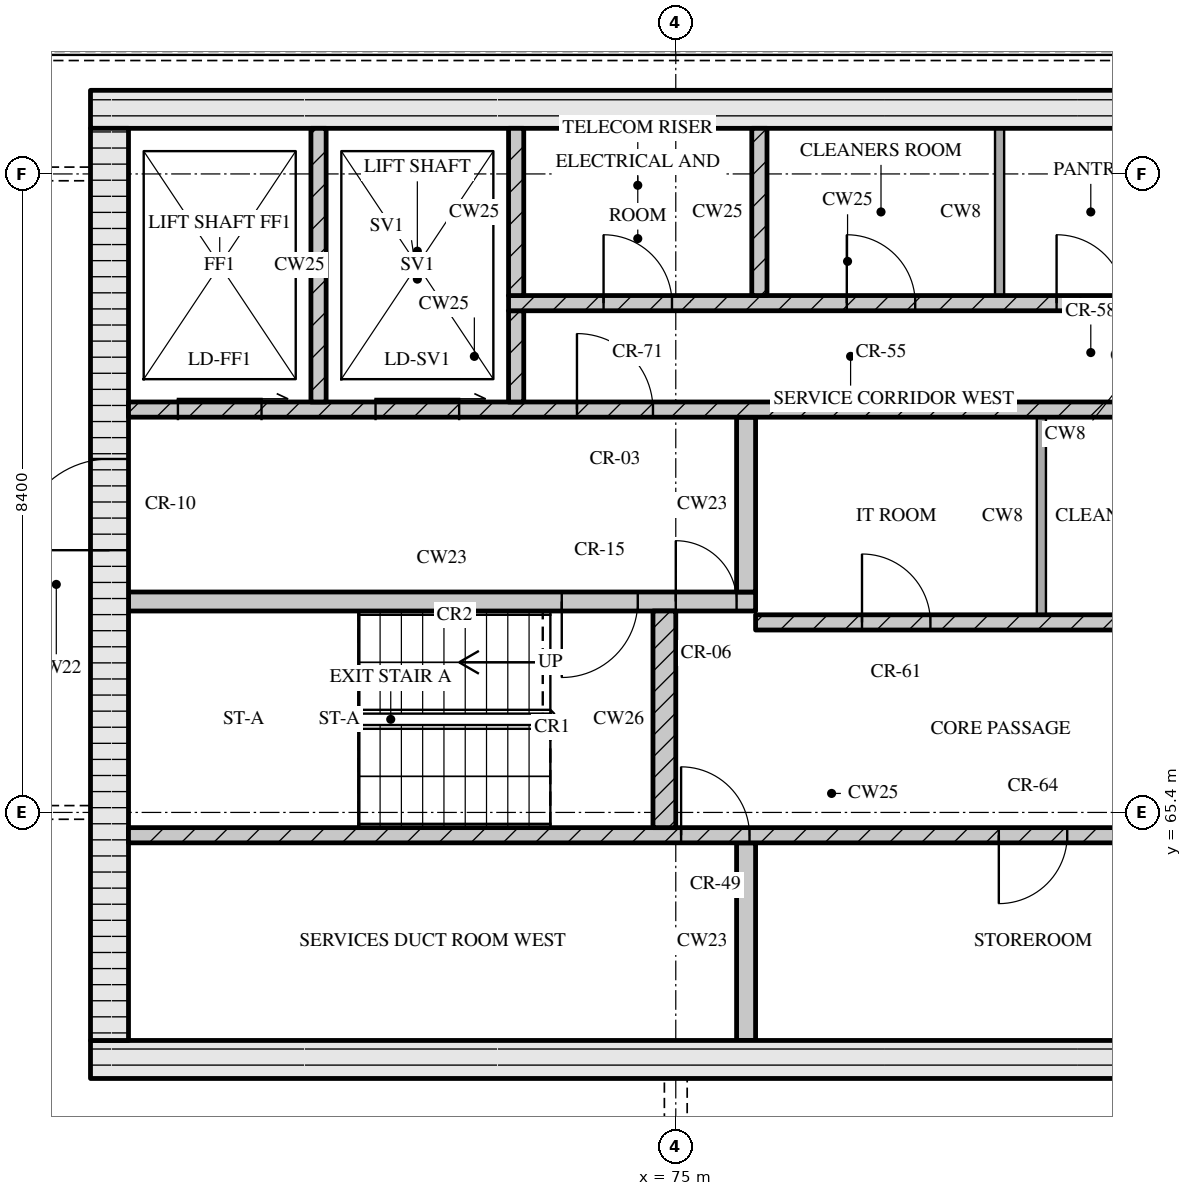
"""IFC4 building model, lengths in metres.
Left out: names, types, materials, properties, quantities, classifications, styles, units other than length and angle.
Written with IfcOpenShell. Run it as: python <this file> out.ifc"""

import sys

from ifc_helpers import new_model, si_unit, direction, frame, frame_2d, origin, place, context, subcontext, project, spatial, rectangle, extrude, element, fill, save


model = new_model("IFC4")
c1 = context("Model", 3, precision=1e-05, world=origin(), true_north=direction((0.0, 1.0)))
c2 = subcontext(c1, "Body", "Model", "MODEL_VIEW")
j1 = project(units=[si_unit("LENGTHUNIT", "METRE"), si_unit("PLANEANGLEUNIT", "RADIAN")], contexts=[c1])
p1 = place(None, origin())
s1 = spatial("IfcSite", under=j1, at=p1, CompositionType="ELEMENT")
p2 = place(p1, origin())
s2 = spatial("IfcBuilding", under=s1, at=p2, CompositionType="ELEMENT")
p3 = place(p2, frame((0.0, 0.0, 267.15)))
s3 = spatial("IfcBuildingStorey", under=s2, at=p3, CompositionType="ELEMENT", Elevation=267.15)
p4 = place(p3, frame((67.3, 62.15, 0.0), z_axis=(0.0, 0.0, 1.0), x_axis=(1.0, 0.0, 0.0)))
e1 = element("IfcWall", 1, at=p4, inside=s3, PredefinedType="SOLIDWALL", context=c2, shape_type="SweptSolid", body=[
    extrude(rectangle(XDim=40.6, YDim=0.5, at=frame_2d((20.3, 0.0))), origin(), (0.0, 0.0, 1.0), 3.32),
])
p5 = place(p4, frame((20.65, 0.0, 0.0)))
e2 = element("IfcOpeningElement", 2, at=p5, cuts=e1, PredefinedType="OPENING", context=c2, shape_type="SweptSolid", body=[
    extrude(rectangle(XDim=1.8, YDim=2.1, at=frame_2d((0.9, 1.05))), frame((0.0, 0.26, 0.0), z_axis=(0.0, -1.0, 0.0), x_axis=(1.0, 0.0, 0.0)), (0.0, 0.0, 1.0), 0.52),
])
p6 = place(p3, frame((67.3, 74.65, 0.0), z_axis=(0.0, 0.0, 1.0), x_axis=(1.0, 0.0, 0.0)))
e3 = element("IfcWall", 3, at=p6, inside=s3, PredefinedType="SOLIDWALL", context=c2, shape_type="SweptSolid", body=[
    extrude(rectangle(XDim=40.6, YDim=0.5, at=frame_2d((20.3, 0.0))), origin(), (0.0, 0.0, 1.0), 3.32),
])
p7 = place(p3, frame((67.55, 62.4, 0.0), z_axis=(0.0, 0.0, 1.0), x_axis=(0.0, 1.0, 0.0)))
e4 = element("IfcWall", 4, at=p7, inside=s3, PredefinedType="SOLIDWALL", context=c2, shape_type="SweptSolid", body=[
    extrude(rectangle(XDim=12.0, YDim=0.5, at=frame_2d((6.0, 0.0))), origin(), (0.0, 0.0, 1.0), 3.32),
])
p8 = place(p7, frame((6.45, 0.0, 0.0)))
e5 = element("IfcOpeningElement", 5, at=p8, cuts=e4, PredefinedType="OPENING", context=c2, shape_type="SweptSolid", body=[
    extrude(rectangle(XDim=1.2, YDim=2.1, at=frame_2d((0.6, 1.05))), frame((0.0, 0.26, 0.0), z_axis=(0.0, -1.0, 0.0), x_axis=(1.0, 0.0, 0.0)), (0.0, 0.0, 1.0), 0.52),
])
p9 = place(p3, frame((75.925, 62.4, 0.0), z_axis=(0.0, 0.0, 1.0), x_axis=(0.0, 1.0, 0.0)))
e6 = element("IfcWall", 6, at=p9, inside=s3, PredefinedType="SOLIDWALL", context=c2, shape_type="SweptSolid", body=[
    extrude(rectangle(XDim=2.6, YDim=0.25, at=frame_2d((1.3, 0.0))), origin(), (0.0, 0.0, 1.0), 3.32),
])
p10 = place(p3, frame((67.8, 65.1, 0.0), z_axis=(0.0, 0.0, 1.0), x_axis=(1.0, 0.0, 0.0)))
e7 = element("IfcWall", 7, at=p10, inside=s3, PredefinedType="SOLIDWALL", context=c2, shape_type="SweptSolid", body=[
    extrude(rectangle(XDim=18.5, YDim=0.2, at=frame_2d((9.25, 0.0))), origin(), (0.0, 0.0, 1.0), 3.32),
])
p11 = place(p10, frame((7.27, 0.0, 0.0)))
e8 = element("IfcOpeningElement", 8, at=p11, cuts=e7, PredefinedType="OPENING", context=c2, shape_type="SweptSolid", body=[
    extrude(rectangle(XDim=0.9, YDim=2.1, at=frame_2d((0.45, 1.05))), frame((0.0, 0.11, 0.0), z_axis=(0.0, -1.0, 0.0), x_axis=(1.0, 0.0, 0.0)), (0.0, 0.0, 1.0), 0.22),
])
p12 = place(p10, frame((11.45, 0.0, 0.0)))
e9 = element("IfcOpeningElement", 9, at=p12, cuts=e7, PredefinedType="OPENING", context=c2, shape_type="SweptSolid", body=[
    extrude(rectangle(XDim=0.9, YDim=2.1, at=frame_2d((0.45, 1.05))), frame((0.0, 0.11, 0.0), z_axis=(0.0, -1.0, 0.0), x_axis=(1.0, 0.0, 0.0)), (0.0, 0.0, 1.0), 0.22),
])
p13 = place(p10, frame((16.7, 0.0, 0.0)))
e10 = element("IfcOpeningElement", 10, at=p13, cuts=e7, PredefinedType="OPENING", context=c2, shape_type="SweptSolid", body=[
    extrude(rectangle(XDim=0.9, YDim=2.1, at=frame_2d((0.45, 1.05))), frame((0.0, 0.11, 0.0), z_axis=(0.0, -1.0, 0.0), x_axis=(1.0, 0.0, 0.0)), (0.0, 0.0, 1.0), 0.22),
])
p14 = place(p3, frame((74.85, 65.2, 0.0), z_axis=(0.0, 0.0, 1.0), x_axis=(0.0, 1.0, 0.0)))
e11 = element("IfcWall", 11, at=p14, inside=s3, PredefinedType="SOLIDWALL", context=c2, shape_type="SweptSolid", body=[
    extrude(rectangle(XDim=2.85, YDim=0.3, at=frame_2d((1.425, 0.0))), origin(), (0.0, 0.0, 1.0), 3.32),
])
p15 = place(p3, frame((76.05, 67.9, 0.0), z_axis=(0.0, 0.0, 1.0), x_axis=(1.0, 0.0, 0.0)))
e12 = element("IfcWall", 12, at=p15, inside=s3, PredefinedType="SOLIDWALL", context=c2, shape_type="SweptSolid", body=[
    extrude(rectangle(XDim=23.1, YDim=0.2, at=frame_2d((11.55, 0.0))), origin(), (0.0, 0.0, 1.0), 3.32),
])
p16 = place(p15, frame((1.4, 0.0, 0.0)))
e13 = element("IfcOpeningElement", 13, at=p16, cuts=e12, PredefinedType="OPENING", context=c2, shape_type="SweptSolid", body=[
    extrude(rectangle(XDim=0.9, YDim=2.1, at=frame_2d((0.45, 1.05))), frame((0.0, 0.11, 0.0), z_axis=(0.0, -1.0, 0.0), x_axis=(1.0, 0.0, 0.0)), (0.0, 0.0, 1.0), 0.22),
])
p17 = place(p15, frame((5.11, 0.0, 0.0)))
e14 = element("IfcOpeningElement", 14, at=p17, cuts=e12, PredefinedType="OPENING", context=c2, shape_type="SweptSolid", body=[
    extrude(rectangle(XDim=0.9, YDim=2.1, at=frame_2d((0.45, 1.05))), frame((0.0, 0.11, 0.0), z_axis=(0.0, -1.0, 0.0), x_axis=(1.0, 0.0, 0.0)), (0.0, 0.0, 1.0), 0.22),
])
p18 = place(p15, frame((8.45, 0.0, 0.0)))
e15 = element("IfcOpeningElement", 15, at=p18, cuts=e12, PredefinedType="OPENING", context=c2, shape_type="SweptSolid", body=[
    extrude(rectangle(XDim=0.9, YDim=2.1, at=frame_2d((0.45, 1.05))), frame((0.0, 0.11, 0.0), z_axis=(0.0, -1.0, 0.0), x_axis=(1.0, 0.0, 0.0)), (0.0, 0.0, 1.0), 0.22),
])
p19 = place(p15, frame((10.91, 0.0, 0.0)))
e16 = element("IfcOpeningElement", 16, at=p19, cuts=e12, PredefinedType="OPENING", context=c2, shape_type="SweptSolid", body=[
    extrude(rectangle(XDim=0.9, YDim=2.1, at=frame_2d((0.45, 1.05))), frame((0.0, 0.11, 0.0), z_axis=(0.0, -1.0, 0.0), x_axis=(1.0, 0.0, 0.0)), (0.0, 0.0, 1.0), 0.22),
])
p20 = place(p15, frame((13.55, 0.0, 0.0)))
e17 = element("IfcOpeningElement", 17, at=p20, cuts=e12, PredefinedType="OPENING", context=c2, shape_type="SweptSolid", body=[
    extrude(rectangle(XDim=1.0, YDim=2.1, at=frame_2d((0.5, 1.05))), frame((0.0, 0.11, 0.0), z_axis=(0.0, -1.0, 0.0), x_axis=(1.0, 0.0, 0.0)), (0.0, 0.0, 1.0), 0.22),
])
p21 = place(p15, frame((16.2, 0.0, 0.0)))
e18 = element("IfcOpeningElement", 18, at=p21, cuts=e12, PredefinedType="OPENING", context=c2, shape_type="SweptSolid", body=[
    extrude(rectangle(XDim=1.1, YDim=2.1, at=frame_2d((0.55, 1.05))), frame((0.0, 0.11, 0.0), z_axis=(0.0, -1.0, 0.0), x_axis=(1.0, 0.0, 0.0)), (0.0, 0.0, 1.0), 0.22),
])
p22 = place(p15, frame((18.7, 0.0, 0.0)))
e19 = element("IfcOpeningElement", 19, at=p22, cuts=e12, PredefinedType="OPENING", context=c2, shape_type="SweptSolid", body=[
    extrude(rectangle(XDim=1.1, YDim=2.1, at=frame_2d((0.55, 1.05))), frame((0.0, 0.11, 0.0), z_axis=(0.0, -1.0, 0.0), x_axis=(1.0, 0.0, 0.0)), (0.0, 0.0, 1.0), 0.22),
])
p23 = place(p15, frame((21.2, 0.0, 0.0)))
e20 = element("IfcOpeningElement", 20, at=p23, cuts=e12, PredefinedType="OPENING", context=c2, shape_type="SweptSolid", body=[
    extrude(rectangle(XDim=1.1, YDim=2.1, at=frame_2d((0.55, 1.05))), frame((0.0, 0.11, 0.0), z_axis=(0.0, -1.0, 0.0), x_axis=(1.0, 0.0, 0.0)), (0.0, 0.0, 1.0), 0.22),
])
p24 = place(p3, frame((79.81, 68.0, 0.0), z_axis=(0.0, 0.0, 1.0), x_axis=(0.0, 1.0, 0.0)))
e21 = element("IfcWall", 21, at=p24, inside=s3, PredefinedType="PARTITIONING", context=c2, shape_type="SweptSolid", body=[
    extrude(rectangle(XDim=2.6, YDim=0.12, at=frame_2d((1.3, 0.0))), origin(), (0.0, 0.0, 1.0), 3.32),
])
p25 = place(p3, frame((67.8, 68.175, 0.0), z_axis=(0.0, 0.0, 1.0), x_axis=(1.0, 0.0, 0.0)))
e22 = element("IfcWall", 22, at=p25, inside=s3, PredefinedType="SOLIDWALL", context=c2, shape_type="SweptSolid", body=[
    extrude(rectangle(XDim=8.25, YDim=0.25, at=frame_2d((4.125, 0.0))), origin(), (0.0, 0.0, 1.0), 3.32),
])
p26 = place(p25, frame((5.7, 0.0, 0.0)))
e23 = element("IfcOpeningElement", 23, at=p26, cuts=e22, PredefinedType="OPENING", context=c2, shape_type="SweptSolid", body=[
    extrude(rectangle(XDim=1.0, YDim=2.1, at=frame_2d((0.5, 1.05))), frame((0.0, 0.135, 0.0), z_axis=(0.0, -1.0, 0.0), x_axis=(1.0, 0.0, 0.0)), (0.0, 0.0, 1.0), 0.27),
])
p27 = place(p25, frame((7.2, 0.0, 0.0)))
e24 = element("IfcOpeningElement", 24, at=p27, cuts=e22, PredefinedType="OPENING", context=c2, shape_type="SweptSolid", body=[
    extrude(rectangle(XDim=0.8, YDim=2.1, at=frame_2d((0.4, 1.05))), frame((0.0, 0.135, 0.0), z_axis=(0.0, -1.0, 0.0), x_axis=(1.0, 0.0, 0.0)), (0.0, 0.0, 1.0), 0.27),
])
p28 = place(p3, frame((75.925, 68.3, 0.0), z_axis=(0.0, 0.0, 1.0), x_axis=(0.0, 1.0, 0.0)))
e25 = element("IfcWall", 25, at=p28, inside=s3, PredefinedType="SOLIDWALL", context=c2, shape_type="SweptSolid", body=[
    extrude(rectangle(XDim=2.3, YDim=0.25, at=frame_2d((1.15, 0.0))), origin(), (0.0, 0.0, 1.0), 3.32),
])
p29 = place(p3, frame((67.8, 70.7, 0.0), z_axis=(0.0, 0.0, 1.0), x_axis=(1.0, 0.0, 0.0)))
e26 = element("IfcWall", 26, at=p29, inside=s3, PredefinedType="SOLIDWALL", context=c2, shape_type="SweptSolid", body=[
    extrude(rectangle(XDim=39.6, YDim=0.2, at=frame_2d((19.8, 0.0))), origin(), (0.0, 0.0, 1.0), 3.32),
])
p30 = place(p29, frame((0.65, 0.0, 0.0)))
e27 = element("IfcOpeningElement", 27, at=p30, cuts=e26, PredefinedType="OPENING", context=c2, shape_type="SweptSolid", body=[
    extrude(rectangle(XDim=1.1, YDim=2.1, at=frame_2d((0.55, 1.05))), frame((0.0, 0.11, 0.0), z_axis=(0.0, -1.0, 0.0), x_axis=(1.0, 0.0, 0.0)), (0.0, 0.0, 1.0), 0.22),
])
p31 = place(p29, frame((3.25, 0.0, 0.0)))
e28 = element("IfcOpeningElement", 28, at=p31, cuts=e26, PredefinedType="OPENING", context=c2, shape_type="SweptSolid", body=[
    extrude(rectangle(XDim=1.1, YDim=2.1, at=frame_2d((0.55, 1.05))), frame((0.0, 0.11, 0.0), z_axis=(0.0, -1.0, 0.0), x_axis=(1.0, 0.0, 0.0)), (0.0, 0.0, 1.0), 0.22),
])
p32 = place(p29, frame((5.9, 0.0, 0.0)))
e29 = element("IfcOpeningElement", 29, at=p32, cuts=e26, PredefinedType="OPENING", context=c2, shape_type="SweptSolid", body=[
    extrude(rectangle(XDim=1.0, YDim=2.1, at=frame_2d((0.5, 1.05))), frame((0.0, 0.11, 0.0), z_axis=(0.0, -1.0, 0.0), x_axis=(1.0, 0.0, 0.0)), (0.0, 0.0, 1.0), 0.22),
])
p33 = place(p29, frame((21.7, 0.0, 0.0)))
e30 = element("IfcOpeningElement", 30, at=p33, cuts=e26, PredefinedType="OPENING", context=c2, shape_type="SweptSolid", body=[
    extrude(rectangle(XDim=1.0, YDim=2.1, at=frame_2d((0.5, 1.05))), frame((0.0, 0.11, 0.0), z_axis=(0.0, -1.0, 0.0), x_axis=(1.0, 0.0, 0.0)), (0.0, 0.0, 1.0), 0.22),
])
p34 = place(p29, frame((32.7, 0.0, 0.0)))
e31 = element("IfcOpeningElement", 31, at=p34, cuts=e26, PredefinedType="OPENING", context=c2, shape_type="SweptSolid", body=[
    extrude(rectangle(XDim=1.0, YDim=2.1, at=frame_2d((0.5, 1.05))), frame((0.0, 0.11, 0.0), z_axis=(0.0, -1.0, 0.0), x_axis=(1.0, 0.0, 0.0)), (0.0, 0.0, 1.0), 0.22),
])
p35 = place(p29, frame((35.25, 0.0, 0.0)))
e32 = element("IfcOpeningElement", 32, at=p35, cuts=e26, PredefinedType="OPENING", context=c2, shape_type="SweptSolid", body=[
    extrude(rectangle(XDim=1.1, YDim=2.1, at=frame_2d((0.55, 1.05))), frame((0.0, 0.11, 0.0), z_axis=(0.0, -1.0, 0.0), x_axis=(1.0, 0.0, 0.0)), (0.0, 0.0, 1.0), 0.22),
])
p36 = place(p29, frame((37.85, 0.0, 0.0)))
e33 = element("IfcOpeningElement", 33, at=p36, cuts=e26, PredefinedType="OPENING", context=c2, shape_type="SweptSolid", body=[
    extrude(rectangle(XDim=1.1, YDim=2.1, at=frame_2d((0.55, 1.05))), frame((0.0, 0.11, 0.0), z_axis=(0.0, -1.0, 0.0), x_axis=(1.0, 0.0, 0.0)), (0.0, 0.0, 1.0), 0.22),
])
p37 = place(p3, frame((70.3, 70.8, 0.0), z_axis=(0.0, 0.0, 1.0), x_axis=(0.0, 1.0, 0.0)))
e34 = element("IfcWall", 34, at=p37, inside=s3, PredefinedType="SOLIDWALL", context=c2, shape_type="SweptSolid", body=[
    extrude(rectangle(XDim=3.6, YDim=0.2, at=frame_2d((1.8, 0.0))), origin(), (0.0, 0.0, 1.0), 3.32),
])
p38 = place(p3, frame((72.9, 70.8, 0.0), z_axis=(0.0, 0.0, 1.0), x_axis=(0.0, 1.0, 0.0)))
e35 = element("IfcWall", 35, at=p38, inside=s3, PredefinedType="SOLIDWALL", context=c2, shape_type="SweptSolid", body=[
    extrude(rectangle(XDim=1.2, YDim=0.2, at=frame_2d((0.6, 0.0))), origin(), (0.0, 0.0, 1.0), 3.32),
])
p39 = place(p3, frame((72.8, 72.1, 0.0), z_axis=(0.0, 0.0, 1.0), x_axis=(1.0, 0.0, 0.0)))
e36 = element("IfcWall", 36, at=p39, inside=s3, PredefinedType="SOLIDWALL", context=c2, shape_type="SweptSolid", body=[
    extrude(rectangle(XDim=8.92, YDim=0.2, at=frame_2d((4.46, 0.0))), origin(), (0.0, 0.0, 1.0), 3.32),
])
p40 = place(p39, frame((1.25, 0.0, 0.0)))
e37 = element("IfcOpeningElement", 37, at=p40, cuts=e36, PredefinedType="OPENING", context=c2, shape_type="SweptSolid", body=[
    extrude(rectangle(XDim=0.9, YDim=2.1, at=frame_2d((0.45, 1.05))), frame((0.0, 0.11, 0.0), z_axis=(0.0, -1.0, 0.0), x_axis=(1.0, 0.0, 0.0)), (0.0, 0.0, 1.0), 0.22),
])
p41 = place(p39, frame((4.45, 0.0, 0.0)))
e38 = element("IfcOpeningElement", 38, at=p41, cuts=e36, PredefinedType="OPENING", context=c2, shape_type="SweptSolid", body=[
    extrude(rectangle(XDim=0.9, YDim=2.1, at=frame_2d((0.45, 1.05))), frame((0.0, 0.11, 0.0), z_axis=(0.0, -1.0, 0.0), x_axis=(1.0, 0.0, 0.0)), (0.0, 0.0, 1.0), 0.22),
])
p42 = place(p39, frame((7.21, 0.0, 0.0)))
e39 = element("IfcOpeningElement", 39, at=p42, cuts=e36, PredefinedType="OPENING", context=c2, shape_type="SweptSolid", body=[
    extrude(rectangle(XDim=0.9, YDim=2.1, at=frame_2d((0.45, 1.05))), frame((0.0, 0.11, 0.0), z_axis=(0.0, -1.0, 0.0), x_axis=(1.0, 0.0, 0.0)), (0.0, 0.0, 1.0), 0.22),
])
for number, where, z_axis, x_axis in (
    (40, (72.9, 72.2, 0.0), (0.0, 0.0, 1.0), (0.0, 1.0, 0.0)),
    (41, (76.1, 72.2, 0.0), (0.0, 0.0, 1.0), (0.0, 1.0, 0.0)),
):
    element("IfcWall", number, at=place(p3, frame(where, z_axis=z_axis, x_axis=x_axis)), inside=s3, PredefinedType="SOLIDWALL", context=c2, shape_type="SweptSolid", body=[
        extrude(rectangle(XDim=2.2, YDim=0.2, at=frame_2d((1.1, 0.0))), origin(), (0.0, 0.0, 1.0), 3.32),
    ])
p43 = place(p3, frame((79.26, 72.2, 0.0), z_axis=(0.0, 0.0, 1.0), x_axis=(0.0, 1.0, 0.0)))
e42 = element("IfcWall", 42, at=p43, inside=s3, PredefinedType="PARTITIONING", context=c2, shape_type="SweptSolid", body=[
    extrude(rectangle(XDim=2.2, YDim=0.12, at=frame_2d((1.1, 0.0))), origin(), (0.0, 0.0, 1.0), 3.32),
])
p44 = place(p11, origin())
e43 = element("IfcDoor", 43, at=p44, inside=s3, OperationType="SINGLE_SWING_LEFT", PredefinedType="DOOR", context=c2, shape_type="SweptSolid", body=[
    extrude(rectangle(XDim=0.9, YDim=2.1, at=frame_2d((0.45, 1.05))), frame((0.0, 0.025, 0.0), z_axis=(0.0, -1.0, 0.0), x_axis=(1.0, 0.0, 0.0)), (0.0, 0.0, 1.0), 0.05),
])
fill(e8, e43)
p45 = place(p12, origin())
e44 = element("IfcDoor", 44, at=p45, inside=s3, OperationType="SINGLE_SWING_RIGHT", PredefinedType="DOOR", context=c2, shape_type="SweptSolid", body=[
    extrude(rectangle(XDim=0.9, YDim=2.1, at=frame_2d((0.45, 1.05))), frame((0.0, 0.025, 0.0), z_axis=(0.0, -1.0, 0.0), x_axis=(1.0, 0.0, 0.0)), (0.0, 0.0, 1.0), 0.05),
])
fill(e9, e44)
p46 = place(p16, origin())
e45 = element("IfcDoor", 45, at=p46, inside=s3, OperationType="SINGLE_SWING_LEFT", PredefinedType="DOOR", context=c2, shape_type="SweptSolid", body=[
    extrude(rectangle(XDim=0.9, YDim=2.1, at=frame_2d((0.45, 1.05))), frame((0.0, 0.025, 0.0), z_axis=(0.0, -1.0, 0.0), x_axis=(1.0, 0.0, 0.0)), (0.0, 0.0, 1.0), 0.05),
])
fill(e13, e45)
p47 = place(p26, origin())
e46 = element("IfcDoor", 46, at=p47, inside=s3, OperationType="SINGLE_SWING_RIGHT", PredefinedType="DOOR", context=c2, shape_type="SweptSolid", body=[
    extrude(rectangle(XDim=1.0, YDim=2.1, at=frame_2d((0.5, 1.05))), frame((0.0, 0.025, 0.0), z_axis=(0.0, -1.0, 0.0), x_axis=(1.0, 0.0, 0.0)), (0.0, 0.0, 1.0), 0.05),
])
fill(e23, e46)
p48 = place(p27, origin())
e47 = element("IfcDoor", 47, at=p48, inside=s3, OperationType="SINGLE_SWING_LEFT", PredefinedType="DOOR", context=c2, shape_type="SweptSolid", body=[
    extrude(rectangle(XDim=0.8, YDim=2.1, at=frame_2d((0.4, 1.05))), frame((0.0, 0.025, 0.0), z_axis=(0.0, -1.0, 0.0), x_axis=(1.0, 0.0, 0.0)), (0.0, 0.0, 1.0), 0.05),
])
fill(e24, e47)
p49 = place(p8, origin())
e48 = element("IfcDoor", 48, at=p49, inside=s3, OperationType="SINGLE_SWING_LEFT", PredefinedType="DOOR", context=c2, shape_type="SweptSolid", body=[
    extrude(rectangle(XDim=1.2, YDim=2.1, at=frame_2d((0.6, 1.05))), frame((0.0, 0.025, 0.0), z_axis=(0.0, -1.0, 0.0), x_axis=(1.0, 0.0, 0.0)), (0.0, 0.0, 1.0), 0.05),
])
fill(e5, e48)
p50 = place(p30, origin())
e49 = element("IfcDoor", 49, at=p50, inside=s3, OperationType="SLIDING_TO_RIGHT", PredefinedType="DOOR", context=c2, shape_type="SweptSolid", body=[
    extrude(rectangle(XDim=1.1, YDim=2.1, at=frame_2d((0.55, 1.05))), frame((0.0, 0.025, 0.0), z_axis=(0.0, -1.0, 0.0), x_axis=(1.0, 0.0, 0.0)), (0.0, 0.0, 1.0), 0.05),
])
fill(e27, e49)
p51 = place(p31, origin())
e50 = element("IfcDoor", 50, at=p51, inside=s3, OperationType="SLIDING_TO_RIGHT", PredefinedType="DOOR", context=c2, shape_type="SweptSolid", body=[
    extrude(rectangle(XDim=1.1, YDim=2.1, at=frame_2d((0.55, 1.05))), frame((0.0, 0.025, 0.0), z_axis=(0.0, -1.0, 0.0), x_axis=(1.0, 0.0, 0.0)), (0.0, 0.0, 1.0), 0.05),
])
fill(e28, e50)
p52 = place(p32, origin())
e51 = element("IfcDoor", 51, at=p52, inside=s3, OperationType="SINGLE_SWING_LEFT", PredefinedType="DOOR", context=c2, shape_type="SweptSolid", body=[
    extrude(rectangle(XDim=1.0, YDim=2.1, at=frame_2d((0.5, 1.05))), frame((0.0, 0.025, 0.0), z_axis=(0.0, -1.0, 0.0), x_axis=(1.0, 0.0, 0.0)), (0.0, 0.0, 1.0), 0.05),
])
fill(e29, e51)
p53 = place(p40, origin())
e52 = element("IfcDoor", 52, at=p53, inside=s3, OperationType="SINGLE_SWING_LEFT", PredefinedType="DOOR", context=c2, shape_type="SweptSolid", body=[
    extrude(rectangle(XDim=0.9, YDim=2.1, at=frame_2d((0.45, 1.05))), frame((0.0, 0.025, 0.0), z_axis=(0.0, -1.0, 0.0), x_axis=(1.0, 0.0, 0.0)), (0.0, 0.0, 1.0), 0.05),
])
fill(e37, e52)
p54 = place(p41, origin())
e53 = element("IfcDoor", 53, at=p54, inside=s3, OperationType="SINGLE_SWING_LEFT", PredefinedType="DOOR", context=c2, shape_type="SweptSolid", body=[
    extrude(rectangle(XDim=0.9, YDim=2.1, at=frame_2d((0.45, 1.05))), frame((0.0, 0.025, 0.0), z_axis=(0.0, -1.0, 0.0), x_axis=(1.0, 0.0, 0.0)), (0.0, 0.0, 1.0), 0.05),
])
fill(e38, e53)
p55 = place(p42, origin())
e54 = element("IfcDoor", 54, at=p55, inside=s3, OperationType="SINGLE_SWING_LEFT", PredefinedType="DOOR", context=c2, shape_type="SweptSolid", body=[
    extrude(rectangle(XDim=0.9, YDim=2.1, at=frame_2d((0.45, 1.05))), frame((0.0, 0.025, 0.0), z_axis=(0.0, -1.0, 0.0), x_axis=(1.0, 0.0, 0.0)), (0.0, 0.0, 1.0), 0.05),
])
fill(e39, e54)
save(model, sys.argv[1])
